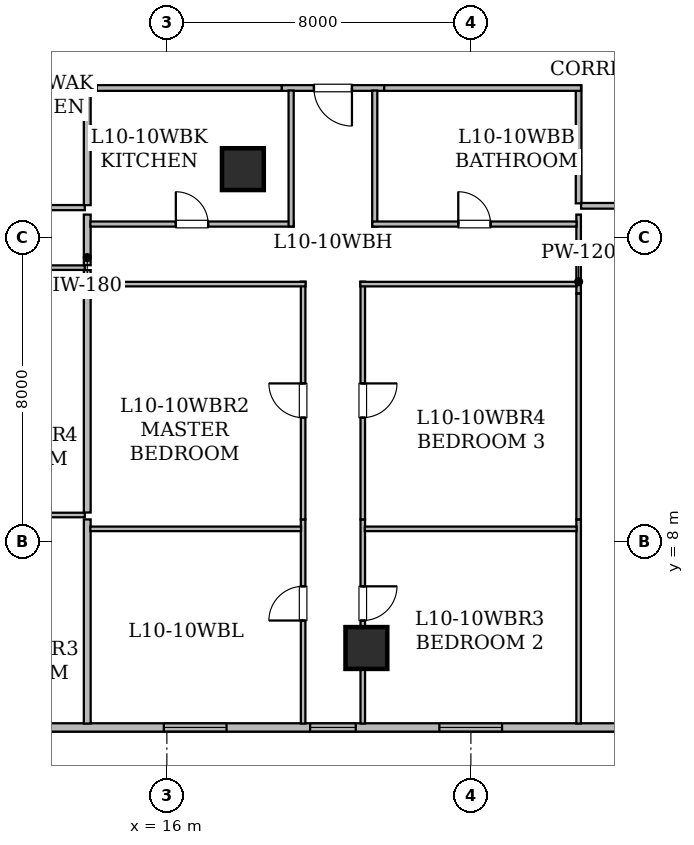
"""IFC4 building model, lengths in metres.
Left out: names, types, materials, properties, quantities, classifications, styles, units other than length and angle.
Written with IfcOpenShell. Run it as: python <this file> out.ifc"""

import sys

from ifc_helpers import new_model, si_unit, direction, frame, frame_2d, origin, origin_2d, place, context, subcontext, project, spatial, rectangle, hollow_rectangle, extrude, element, fill, save


model = new_model("IFC4")
c1 = context("Model", 3, precision=1e-05, world=origin(), true_north=direction((0.0, 1.0)))
c2 = subcontext(c1, "Body", "Model", "MODEL_VIEW")
j1 = project(units=[si_unit("LENGTHUNIT", "METRE"), si_unit("PLANEANGLEUNIT", "RADIAN")], contexts=[c1])
p1 = place(None, origin())
s1 = spatial("IfcSite", under=j1, at=p1, CompositionType="ELEMENT")
p2 = place(p1, origin())
s2 = spatial("IfcBuilding", under=s1, at=p2, CompositionType="ELEMENT")
p3 = place(p2, frame((0.0, 0.0, 44.25)))
s3 = spatial("IfcBuildingStorey", under=s2, at=p3, CompositionType="ELEMENT", Elevation=44.25)
for number, where, z_axis, x_axis in (
    (1, (21.25, 5.2, 0.0), (0.0, 0.0, 1.0), (1.0, 0.0, 0.0)),
    (2, (18.0, 17.8, 0.0), (0.0, 0.0, 1.0), (1.0, 0.0, 0.0)),
):
    element("IfcColumn", number, at=place(p3, frame(where, z_axis=z_axis, x_axis=x_axis)), inside=s3, PredefinedType="COLUMN", context=c2, shape_type="SweptSolid", body=[
        extrude(hollow_rectangle(XDim=1.1, YDim=1.1, WallThickness=0.055, at=origin_2d()), origin(), (0.0, 0.0, 1.0), 3.65),
    ])
p4 = place(p3, frame((45.683, 3.11, 0.0), z_axis=(0.0, 0.0, 1.0), x_axis=(-1.0, 0.0, 0.0)))
e3 = element("IfcWall", 3, at=p4, inside=s3, PredefinedType="STANDARD", context=c2, shape_type="SweptSolid", body=[
    extrude(rectangle(XDim=37.368, YDim=0.22, at=frame_2d((18.684, 0.0))), origin(), (0.0, 0.0, 1.0), 3.43),
])
p5 = place(p4, frame((14.508, 0.0, 0.85)))
e4 = element("IfcOpeningElement", 4, at=p5, cuts=e3, PredefinedType="OPENING", context=c2, shape_type="SweptSolid", body=[
    extrude(rectangle(XDim=1.65, YDim=1.55, at=frame_2d((0.825, 0.775))), frame((0.0, 0.12, 0.0), z_axis=(0.0, -1.0, 0.0), x_axis=(1.0, 0.0, 0.0)), (0.0, 0.0, 1.0), 0.24),
])
p6 = place(p4, frame((33.025, 0.0, 0.85)))
e5 = element("IfcOpeningElement", 5, at=p6, cuts=e3, PredefinedType="OPENING", context=c2, shape_type="SweptSolid", body=[
    extrude(rectangle(XDim=1.65, YDim=1.55, at=frame_2d((0.825, 0.775))), frame((0.0, 0.12, 0.0), z_axis=(0.0, -1.0, 0.0), x_axis=(1.0, 0.0, 0.0)), (0.0, 0.0, 1.0), 0.24),
])
p7 = place(p4, frame((24.713, 0.0, 0.8)))
e6 = element("IfcOpeningElement", 6, at=p7, cuts=e3, PredefinedType="OPENING", context=c2, shape_type="SweptSolid", body=[
    extrude(rectangle(XDim=1.2, YDim=1.5, at=frame_2d((0.6, 0.75))), frame((0.0, 0.12, 0.0), z_axis=(0.0, -1.0, 0.0), x_axis=(1.0, 0.0, 0.0)), (0.0, 0.0, 1.0), 0.24),
])
p8 = place(p4, frame((28.113, 0.0, 0.85)))
e7 = element("IfcOpeningElement", 7, at=p8, cuts=e3, PredefinedType="OPENING", context=c2, shape_type="SweptSolid", body=[
    extrude(rectangle(XDim=1.65, YDim=1.55, at=frame_2d((0.825, 0.775))), frame((0.0, 0.12, 0.0), z_axis=(0.0, -1.0, 0.0), x_axis=(1.0, 0.0, 0.0)), (0.0, 0.0, 1.0), 0.24),
])
p9 = place(p4, frame((20.863, 0.0, 0.85)))
e8 = element("IfcOpeningElement", 8, at=p9, cuts=e3, PredefinedType="OPENING", context=c2, shape_type="SweptSolid", body=[
    extrude(rectangle(XDim=1.65, YDim=1.55, at=frame_2d((0.825, 0.775))), frame((0.0, 0.12, 0.0), z_axis=(0.0, -1.0, 0.0), x_axis=(1.0, 0.0, 0.0)), (0.0, 0.0, 1.0), 0.24),
])
p10 = place(p4, frame((10.428, 0.0, 0.8)))
e9 = element("IfcOpeningElement", 9, at=p10, cuts=e3, PredefinedType="OPENING", context=c2, shape_type="SweptSolid", body=[
    extrude(rectangle(XDim=1.2, YDim=1.5, at=frame_2d((0.6, 0.75))), frame((0.0, 0.12, 0.0), z_axis=(0.0, -1.0, 0.0), x_axis=(1.0, 0.0, 0.0)), (0.0, 0.0, 1.0), 0.24),
])
p11 = place(p4, frame((6.453, 0.0, 0.85)))
e10 = element("IfcOpeningElement", 10, at=p11, cuts=e3, PredefinedType="OPENING", context=c2, shape_type="SweptSolid", body=[
    extrude(rectangle(XDim=1.65, YDim=1.55, at=frame_2d((0.825, 0.775))), frame((0.0, 0.12, 0.0), z_axis=(0.0, -1.0, 0.0), x_axis=(1.0, 0.0, 0.0)), (0.0, 0.0, 1.0), 0.24),
])
p12 = place(p4, frame((2.157, 0.0, 0.85)))
e11 = element("IfcOpeningElement", 11, at=p12, cuts=e3, PredefinedType="OPENING", context=c2, shape_type="SweptSolid", body=[
    extrude(rectangle(XDim=1.65, YDim=1.55, at=frame_2d((0.825, 0.775))), frame((0.0, 0.12, 0.0), z_axis=(0.0, -1.0, 0.0), x_axis=(1.0, 0.0, 0.0)), (0.0, 0.0, 1.0), 0.24),
])
p13 = place(p3, frame((34.114, 16.835, 0.0), z_axis=(0.0, 0.0, 1.0), x_axis=(-1.0, 0.0, 0.0)))
e12 = element("IfcWall", 12, at=p13, inside=s3, PredefinedType="STANDARD", context=c2, shape_type="SweptSolid", body=[
    extrude(rectangle(XDim=7.214, YDim=0.15, at=frame_2d((3.607, 0.0))), origin(), (0.0, 0.0, 1.0), 2.647),
])
p14 = place(p13, frame((3.053, 0.0, 0.0)))
e13 = element("IfcOpeningElement", 13, at=p14, cuts=e12, PredefinedType="OPENING", context=c2, shape_type="SweptSolid", body=[
    extrude(rectangle(XDim=1.15, YDim=2.2, at=frame_2d((0.575, 1.1))), frame((0.0, 0.085, 0.0), z_axis=(0.0, -1.0, 0.0), x_axis=(1.0, 0.0, 0.0)), (0.0, 0.0, 1.0), 0.17),
])
p15 = place(p3, frame((14.154, 19.935, 0.0), z_axis=(0.0, 0.0, 1.0), x_axis=(-1.0, 0.0, 0.0)))
e14 = element("IfcWall", 14, at=p15, inside=s3, PredefinedType="STANDARD", context=c2, shape_type="SweptSolid", body=[
    extrude(rectangle(XDim=3.83, YDim=0.15, at=frame_2d((1.915, 0.0))), origin(), (0.0, 0.0, 1.0), 3.43),
])
p16 = place(p3, frame((21.719, 19.935, 0.0), z_axis=(0.0, 0.0, 1.0), x_axis=(-1.0, 0.0, 0.0)))
e15 = element("IfcWall", 15, at=p16, inside=s3, PredefinedType="STANDARD", context=c2, shape_type="SweptSolid", body=[
    extrude(rectangle(XDim=2.698, YDim=0.15, at=frame_2d((1.349, 0.0))), origin(), (0.0, 0.0, 1.0), 3.43),
])
p17 = place(p16, frame((0.849, 0.0, 0.0)))
e16 = element("IfcOpeningElement", 16, at=p17, cuts=e15, PredefinedType="OPENING", context=c2, shape_type="SweptSolid", body=[
    extrude(rectangle(XDim=1.0, YDim=2.15, at=frame_2d((0.5, 1.075))), frame((0.0, 0.085, 0.0), z_axis=(0.0, -1.0, 0.0), x_axis=(1.0, 0.0, 0.0)), (0.0, 0.0, 1.0), 0.17),
])
p18 = place(p3, frame((26.835, 16.9, 0.0), z_axis=(0.0, 0.0, 1.0), x_axis=(0.0, 1.0, 0.0)))
e17 = element("IfcWall", 17, at=p18, inside=s3, PredefinedType="STANDARD", context=c2, shape_type="SweptSolid", body=[
    extrude(rectangle(XDim=3.1, YDim=0.15, at=frame_2d((1.55, 0.0))), origin(), (0.0, 0.0, 1.0), 2.647),
])
p19 = place(p3, frame((26.898, 19.935, 0.0), z_axis=(0.0, 0.0, 1.0), x_axis=(-1.0, 0.0, 0.0)))
e18 = element("IfcWall", 18, at=p19, inside=s3, PredefinedType="STANDARD", context=c2, shape_type="SweptSolid", body=[
    extrude(rectangle(XDim=5.179, YDim=0.15, at=frame_2d((2.589, 0.0))), origin(), (0.0, 0.0, 1.0), 3.43),
])
p20 = place(p3, frame((19.021, 19.935, 0.0), z_axis=(0.0, 0.0, 1.0), x_axis=(-1.0, 0.0, 0.0)))
e19 = element("IfcWall", 19, at=p20, inside=s3, PredefinedType="STANDARD", context=c2, shape_type="SweptSolid", body=[
    extrude(rectangle(XDim=4.867, YDim=0.15, at=frame_2d((2.434, 0.0))), origin(), (0.0, 0.0, 1.0), 2.647),
])
p21 = place(p3, frame((26.835, 14.526, 0.0), z_axis=(0.0, 0.0, 1.0), x_axis=(0.0, 1.0, 0.0)))
e20 = element("IfcWall", 20, at=p21, inside=s3, PredefinedType="PARTITIONING", context=c2, shape_type="SweptSolid", body=[
    extrude(rectangle(XDim=2.078, YDim=0.12, at=frame_2d((1.039, 0.0))), origin(), (0.0, 0.0, 1.0), 3.43),
])
p22 = place(p3, frame((26.835, 3.212, 0.0), z_axis=(0.0, 0.0, 1.0), x_axis=(0.0, 1.0, 0.0)))
e21 = element("IfcWall", 21, at=p22, inside=s3, PredefinedType="PARTITIONING", context=c2, shape_type="SweptSolid", body=[
    extrude(rectangle(XDim=5.372, YDim=0.12, at=frame_2d((2.686, 0.0))), origin(), (0.0, 0.0, 1.0), 2.803),
])
p23 = place(p3, frame((26.835, 8.584, 0.0), z_axis=(0.0, 0.0, 1.0), x_axis=(0.0, 1.0, 0.0)))
e22 = element("IfcWall", 22, at=p23, inside=s3, PredefinedType="PARTITIONING", context=c2, shape_type="SweptSolid", body=[
    extrude(rectangle(XDim=5.942, YDim=0.12, at=frame_2d((2.971, 0.0))), origin(), (0.0, 0.0, 1.0), 3.43),
])
p24 = place(p3, frame((10.01, 16.788, 0.0), z_axis=(0.0, 0.0, 1.0), x_axis=(1.0, 0.0, 0.0)))
e23 = element("IfcWall", 23, at=p24, inside=s3, PredefinedType="PARTITIONING", context=c2, shape_type="SweptSolid", body=[
    extrude(rectangle(XDim=3.83, YDim=0.135, at=frame_2d((1.915, 0.0))), origin(), (0.0, 0.0, 1.0), 2.647),
])
p25 = place(p24, frame((1.49, 0.0, 0.0)))
e24 = element("IfcOpeningElement", 24, at=p25, cuts=e23, PredefinedType="OPENING", context=c2, shape_type="SweptSolid", body=[
    extrude(rectangle(XDim=0.85, YDim=2.1, at=frame_2d((0.425, 1.05))), frame((0.0, 0.077, 0.0), z_axis=(0.0, -1.0, 0.0), x_axis=(1.0, 0.0, 0.0)), (0.0, 0.0, 1.0), 0.155),
])
p26 = place(p3, frame((13.84, 15.208, 0.0), z_axis=(0.0, 0.0, 1.0), x_axis=(-1.0, 0.0, 0.0)))
e25 = element("IfcWall", 25, at=p26, inside=s3, PredefinedType="PARTITIONING", context=c2, shape_type="SweptSolid", body=[
    extrude(rectangle(XDim=4.145, YDim=0.12, at=frame_2d((2.073, 0.0))), origin(), (0.0, 0.0, 1.0), 3.43),
])
p27 = place(p3, frame((13.905, 16.604, 0.0), z_axis=(0.0, 0.0, 1.0), x_axis=(0.0, -1.0, 0.0)))
e26 = element("IfcWall", 26, at=p27, inside=s3, PredefinedType="STANDARD", context=c2, shape_type="SweptSolid", body=[
    extrude(rectangle(XDim=1.331, YDim=0.18, at=frame_2d((0.666, 0.0))), origin(), (0.0, 0.0, 1.0), 3.43),
])
p28 = place(p3, frame((13.905, 19.868, 0.0), z_axis=(0.0, 0.0, 1.0), x_axis=(0.0, -1.0, 0.0)))
e27 = element("IfcWall", 27, at=p28, inside=s3, PredefinedType="STANDARD", context=c2, shape_type="SweptSolid", body=[
    extrude(rectangle(XDim=3.015, YDim=0.18, at=frame_2d((1.507, 0.0))), origin(), (0.0, 0.0, 1.0), 2.647),
])
p29 = place(p3, frame((9.814, 8.7, 0.0), z_axis=(0.0, 0.0, 1.0), x_axis=(1.0, 0.0, 0.0)))
e28 = element("IfcWall", 28, at=p29, inside=s3, PredefinedType="PARTITIONING", context=c2, shape_type="SweptSolid", body=[
    extrude(rectangle(XDim=4.026, YDim=0.12, at=frame_2d((2.013, 0.0))), origin(), (0.0, 0.0, 1.0), 2.647),
])
p30 = place(p3, frame((13.905, 8.584, 0.0), z_axis=(0.0, 0.0, 1.0), x_axis=(0.0, -1.0, 0.0)))
e29 = element("IfcWall", 29, at=p30, inside=s3, PredefinedType="STANDARD", context=c2, shape_type="SweptSolid", body=[
    extrude(rectangle(XDim=5.372, YDim=0.18, at=frame_2d((2.686, 0.0))), origin(), (0.0, 0.0, 1.0), 2.803),
])
p31 = place(p3, frame((13.905, 15.143, 0.0), z_axis=(0.0, 0.0, 1.0), x_axis=(0.0, -1.0, 0.0)))
e30 = element("IfcWall", 30, at=p31, inside=s3, PredefinedType="STANDARD", context=c2, shape_type="SweptSolid", body=[
    extrude(rectangle(XDim=0.617, YDim=0.18, at=frame_2d((0.309, 0.0))), origin(), (0.0, 0.0, 1.0), 3.43),
])
p32 = place(p3, frame((13.905, 14.526, 0.0), z_axis=(0.0, 0.0, 1.0), x_axis=(0.0, -1.0, 0.0)))
e31 = element("IfcWall", 31, at=p32, inside=s3, PredefinedType="STANDARD", context=c2, shape_type="SweptSolid", body=[
    extrude(rectangle(XDim=5.761, YDim=0.18, at=frame_2d((2.88, 0.0))), origin(), (0.0, 0.0, 1.0), 2.647),
])
p33 = place(p3, frame((21.47, 19.868, 0.0), z_axis=(0.0, 0.0, 1.0), x_axis=(0.0, -1.0, 0.0)))
e32 = element("IfcWall", 32, at=p33, inside=s3, PredefinedType="PARTITIONING", context=c2, shape_type="SweptSolid", body=[
    extrude(rectangle(XDim=3.578, YDim=0.135, at=frame_2d((1.789, 0.0))), origin(), (0.0, 0.0, 1.0), 2.647),
])
p34 = place(p3, frame((21.405, 16.355, 0.0), z_axis=(0.0, 0.0, 1.0), x_axis=(1.0, 0.0, 0.0)))
e33 = element("IfcWall", 33, at=p34, inside=s3, PredefinedType="PARTITIONING", context=c2, shape_type="SweptSolid", body=[
    extrude(rectangle(XDim=5.376, YDim=0.135, at=frame_2d((2.688, 0.0))), origin(), (0.0, 0.0, 1.0), 3.43),
])
p35 = place(p34, frame((2.263, 0.0, 0.0)))
e34 = element("IfcOpeningElement", 34, at=p35, cuts=e33, PredefinedType="OPENING", context=c2, shape_type="SweptSolid", body=[
    extrude(rectangle(XDim=0.85, YDim=2.1, at=frame_2d((0.425, 1.05))), frame((0.0, 0.077, 0.0), z_axis=(0.0, -1.0, 0.0), x_axis=(1.0, 0.0, 0.0)), (0.0, 0.0, 1.0), 0.155),
])
p36 = place(p3, frame((13.987, 16.355, 0.0), z_axis=(0.0, 0.0, 1.0), x_axis=(1.0, 0.0, 0.0)))
e35 = element("IfcWall", 35, at=p36, inside=s3, PredefinedType="PARTITIONING", context=c2, shape_type="SweptSolid", body=[
    extrude(rectangle(XDim=5.348, YDim=0.135, at=frame_2d((2.674, 0.0))), origin(), (0.0, 0.0, 1.0), 2.647),
])
p37 = place(p36, frame((2.249, 0.0, 0.0)))
e36 = element("IfcOpeningElement", 36, at=p37, cuts=e35, PredefinedType="OPENING", context=c2, shape_type="SweptSolid", body=[
    extrude(rectangle(XDim=0.85, YDim=2.1, at=frame_2d((0.425, 1.05))), frame((0.0, 0.077, 0.0), z_axis=(0.0, -1.0, 0.0), x_axis=(1.0, 0.0, 0.0)), (0.0, 0.0, 1.0), 0.155),
])
p38 = place(p3, frame((19.27, 16.29, 0.0), z_axis=(0.0, 0.0, 1.0), x_axis=(0.0, 1.0, 0.0)))
e37 = element("IfcWall", 37, at=p38, inside=s3, PredefinedType="PARTITIONING", context=c2, shape_type="SweptSolid", body=[
    extrude(rectangle(XDim=3.578, YDim=0.135, at=frame_2d((1.789, 0.0))), origin(), (0.0, 0.0, 1.0), 2.647),
])
p39 = place(p3, frame((19.585, 3.212, 0.0), z_axis=(0.0, 0.0, 1.0), x_axis=(0.0, 1.0, 0.0)))
e38 = element("IfcWall", 38, at=p39, inside=s3, PredefinedType="PARTITIONING", context=c2, shape_type="SweptSolid", body=[
    extrude(rectangle(XDim=5.372, YDim=0.12, at=frame_2d((2.686, 0.0))), origin(), (0.0, 0.0, 1.0), 2.803),
])
p40 = place(p39, frame((2.711, 0.0, 0.0)))
e39 = element("IfcOpeningElement", 39, at=p40, cuts=e38, PredefinedType="OPENING", context=c2, shape_type="SweptSolid", body=[
    extrude(rectangle(XDim=0.9, YDim=2.1, at=frame_2d((0.45, 1.05))), frame((0.0, 0.07, 0.0), z_axis=(0.0, -1.0, 0.0), x_axis=(1.0, 0.0, 0.0)), (0.0, 0.0, 1.0), 0.14),
])
p41 = place(p3, frame((19.585, 8.584, 0.0), z_axis=(0.0, 0.0, 1.0), x_axis=(0.0, 1.0, 0.0)))
e40 = element("IfcWall", 40, at=p41, inside=s3, PredefinedType="PARTITIONING", context=c2, shape_type="SweptSolid", body=[
    extrude(rectangle(XDim=6.256, YDim=0.12, at=frame_2d((3.128, 0.0))), origin(), (0.0, 0.0, 1.0), 2.647),
])
p42 = place(p41, frame((2.678, 0.0, 0.0)))
e41 = element("IfcOpeningElement", 41, at=p42, cuts=e40, PredefinedType="OPENING", context=c2, shape_type="SweptSolid", body=[
    extrude(rectangle(XDim=0.9, YDim=2.1, at=frame_2d((0.45, 1.05))), frame((0.0, 0.07, 0.0), z_axis=(0.0, -1.0, 0.0), x_axis=(1.0, 0.0, 0.0)), (0.0, 0.0, 1.0), 0.14),
])
p43 = place(p3, frame((19.65, 14.775, 0.0), z_axis=(0.0, 0.0, 1.0), x_axis=(-1.0, 0.0, 0.0)))
e42 = element("IfcWall", 42, at=p43, inside=s3, PredefinedType="PARTITIONING", context=c2, shape_type="SweptSolid", body=[
    extrude(rectangle(XDim=5.663, YDim=0.12, at=frame_2d((2.832, 0.0))), origin(), (0.0, 0.0, 1.0), 2.647),
])
p44 = place(p3, frame((21.155, 8.584, 0.0), z_axis=(0.0, 0.0, 1.0), x_axis=(0.0, -1.0, 0.0)))
e43 = element("IfcWall", 43, at=p44, inside=s3, PredefinedType="PARTITIONING", context=c2, shape_type="SweptSolid", body=[
    extrude(rectangle(XDim=5.372, YDim=0.12, at=frame_2d((2.686, 0.0))), origin(), (0.0, 0.0, 1.0), 2.647),
])
p45 = place(p44, frame((1.761, 0.0, 0.0)))
e44 = element("IfcOpeningElement", 44, at=p45, cuts=e43, PredefinedType="OPENING", context=c2, shape_type="SweptSolid", body=[
    extrude(rectangle(XDim=0.9, YDim=2.1, at=frame_2d((0.45, 1.05))), frame((0.0, 0.07, 0.0), z_axis=(0.0, -1.0, 0.0), x_axis=(1.0, 0.0, 0.0)), (0.0, 0.0, 1.0), 0.14),
])
p46 = place(p3, frame((21.155, 14.84, 0.0), z_axis=(0.0, 0.0, 1.0), x_axis=(0.0, -1.0, 0.0)))
e45 = element("IfcWall", 45, at=p46, inside=s3, PredefinedType="PARTITIONING", context=c2, shape_type="SweptSolid", body=[
    extrude(rectangle(XDim=6.256, YDim=0.12, at=frame_2d((3.128, 0.0))), origin(), (0.0, 0.0, 1.0), 3.43),
])
p47 = place(p46, frame((2.678, 0.0, 0.0)))
e46 = element("IfcOpeningElement", 46, at=p47, cuts=e45, PredefinedType="OPENING", context=c2, shape_type="SweptSolid", body=[
    extrude(rectangle(XDim=0.9, YDim=2.1, at=frame_2d((0.45, 1.05))), frame((0.0, 0.07, 0.0), z_axis=(0.0, -1.0, 0.0), x_axis=(1.0, 0.0, 0.0)), (0.0, 0.0, 1.0), 0.14),
])
p48 = place(p3, frame((26.781, 14.775, 0.0), z_axis=(0.0, 0.0, 1.0), x_axis=(-1.0, 0.0, 0.0)))
e47 = element("IfcWall", 47, at=p48, inside=s3, PredefinedType="PARTITIONING", context=c2, shape_type="SweptSolid", body=[
    extrude(rectangle(XDim=5.691, YDim=0.12, at=frame_2d((2.845, 0.0))), origin(), (0.0, 0.0, 1.0), 3.43),
])
p49 = place(p3, frame((13.987, 8.335, 0.0), z_axis=(0.0, 0.0, 1.0), x_axis=(1.0, 0.0, 0.0)))
e48 = element("IfcWall", 48, at=p49, inside=s3, PredefinedType="PARTITIONING", context=c2, shape_type="SweptSolid", body=[
    extrude(rectangle(XDim=5.544, YDim=0.12, at=frame_2d((2.772, 0.0))), origin(), (0.0, 0.0, 1.0), 3.43),
])
p50 = place(p3, frame((21.209, 8.335, 0.0), z_axis=(0.0, 0.0, 1.0), x_axis=(1.0, 0.0, 0.0)))
e49 = element("IfcWall", 49, at=p50, inside=s3, PredefinedType="PARTITIONING", context=c2, shape_type="SweptSolid", body=[
    extrude(rectangle(XDim=5.572, YDim=0.12, at=frame_2d((2.786, 0.0))), origin(), (0.0, 0.0, 1.0), 3.43),
])
p51 = place(p7, origin())
e50 = element("IfcWindow", 50, at=p51, inside=s3, PartitioningType="SINGLE_PANEL", PredefinedType="WINDOW", context=c2, shape_type="SweptSolid", body=[
    extrude(rectangle(XDim=1.2, YDim=1.5, at=frame_2d((0.6, 0.75))), frame((0.0, 0.03, 0.0), z_axis=(0.0, -1.0, 0.0), x_axis=(1.0, 0.0, 0.0)), (0.0, 0.0, 1.0), 0.06),
])
fill(e6, e50)
p52 = place(p8, origin())
e51 = element("IfcWindow", 51, at=p52, inside=s3, PartitioningType="SINGLE_PANEL", PredefinedType="WINDOW", context=c2, shape_type="SweptSolid", body=[
    extrude(rectangle(XDim=1.65, YDim=1.55, at=frame_2d((0.825, 0.775))), frame((0.0, 0.03, 0.0), z_axis=(0.0, -1.0, 0.0), x_axis=(1.0, 0.0, 0.0)), (0.0, 0.0, 1.0), 0.06),
])
fill(e7, e51)
p53 = place(p9, origin())
e52 = element("IfcWindow", 52, at=p53, inside=s3, PartitioningType="SINGLE_PANEL", PredefinedType="WINDOW", context=c2, shape_type="SweptSolid", body=[
    extrude(rectangle(XDim=1.65, YDim=1.55, at=frame_2d((0.825, 0.775))), frame((0.0, 0.03, 0.0), z_axis=(0.0, -1.0, 0.0), x_axis=(1.0, 0.0, 0.0)), (0.0, 0.0, 1.0), 0.06),
])
fill(e8, e52)
p54 = place(p17, origin())
e53 = element("IfcDoor", 53, at=p54, inside=s3, OperationType="SINGLE_SWING_LEFT", PredefinedType="DOOR", context=c2, shape_type="SweptSolid", body=[
    extrude(rectangle(XDim=1.0, YDim=2.15, at=frame_2d((0.5, 1.075))), frame((0.0, 0.025, 0.0), z_axis=(0.0, -1.0, 0.0), x_axis=(1.0, 0.0, 0.0)), (0.0, 0.0, 1.0), 0.05),
])
fill(e16, e53)
p55 = place(p35, origin())
e54 = element("IfcDoor", 54, at=p55, inside=s3, OperationType="SINGLE_SWING_LEFT", PredefinedType="DOOR", context=c2, shape_type="SweptSolid", body=[
    extrude(rectangle(XDim=0.85, YDim=2.1, at=frame_2d((0.425, 1.05))), frame((0.0, 0.025, 0.0), z_axis=(0.0, -1.0, 0.0), x_axis=(1.0, 0.0, 0.0)), (0.0, 0.0, 1.0), 0.05),
])
fill(e34, e54)
p56 = place(p37, origin())
e55 = element("IfcDoor", 55, at=p56, inside=s3, OperationType="SINGLE_SWING_LEFT", PredefinedType="DOOR", context=c2, shape_type="SweptSolid", body=[
    extrude(rectangle(XDim=0.85, YDim=2.1, at=frame_2d((0.425, 1.05))), frame((0.0, 0.025, 0.0), z_axis=(0.0, -1.0, 0.0), x_axis=(1.0, 0.0, 0.0)), (0.0, 0.0, 1.0), 0.05),
])
fill(e36, e55)
p57 = place(p40, origin())
e56 = element("IfcDoor", 56, at=p57, inside=s3, OperationType="SINGLE_SWING_LEFT", PredefinedType="DOOR", context=c2, shape_type="SweptSolid", body=[
    extrude(rectangle(XDim=0.9, YDim=2.1, at=frame_2d((0.45, 1.05))), frame((0.0, 0.025, 0.0), z_axis=(0.0, -1.0, 0.0), x_axis=(1.0, 0.0, 0.0)), (0.0, 0.0, 1.0), 0.05),
])
fill(e39, e56)
p58 = place(p42, origin())
e57 = element("IfcDoor", 57, at=p58, inside=s3, OperationType="SINGLE_SWING_RIGHT", PredefinedType="DOOR", context=c2, shape_type="SweptSolid", body=[
    extrude(rectangle(XDim=0.9, YDim=2.1, at=frame_2d((0.45, 1.05))), frame((0.0, 0.025, 0.0), z_axis=(0.0, -1.0, 0.0), x_axis=(1.0, 0.0, 0.0)), (0.0, 0.0, 1.0), 0.05),
])
fill(e41, e57)
p59 = place(p45, origin())
e58 = element("IfcDoor", 58, at=p59, inside=s3, OperationType="SINGLE_SWING_LEFT", PredefinedType="DOOR", context=c2, shape_type="SweptSolid", body=[
    extrude(rectangle(XDim=0.9, YDim=2.1, at=frame_2d((0.45, 1.05))), frame((0.0, 0.025, 0.0), z_axis=(0.0, -1.0, 0.0), x_axis=(1.0, 0.0, 0.0)), (0.0, 0.0, 1.0), 0.05),
])
fill(e44, e58)
p60 = place(p47, origin())
e59 = element("IfcDoor", 59, at=p60, inside=s3, OperationType="SINGLE_SWING_LEFT", PredefinedType="DOOR", context=c2, shape_type="SweptSolid", body=[
    extrude(rectangle(XDim=0.9, YDim=2.1, at=frame_2d((0.45, 1.05))), frame((0.0, 0.025, 0.0), z_axis=(0.0, -1.0, 0.0), x_axis=(1.0, 0.0, 0.0)), (0.0, 0.0, 1.0), 0.05),
])
fill(e46, e59)
save(model, sys.argv[1])
